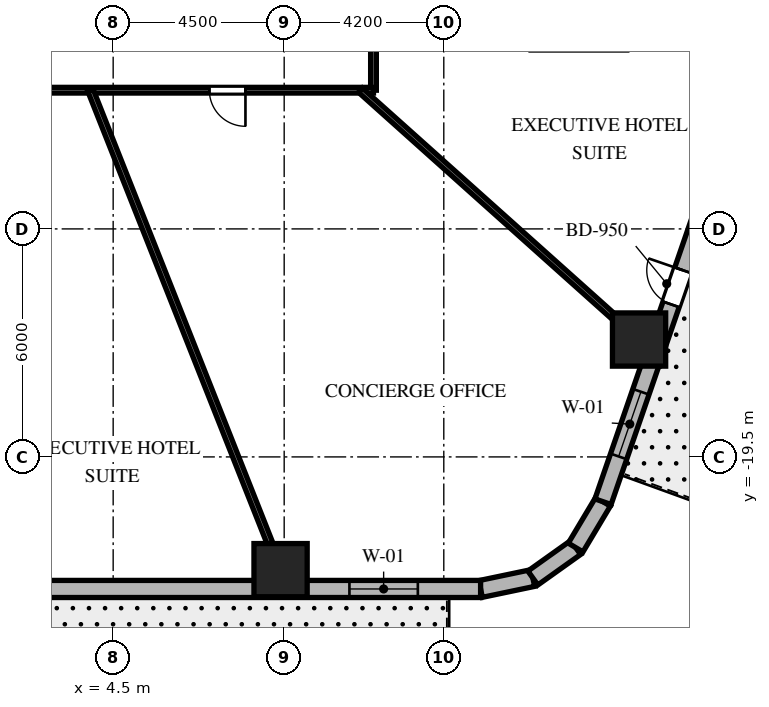
"""IFC4 building model, lengths in metres.
Left out: names, types, materials, properties, quantities, classifications, styles, units other than length and angle.
Written with IfcOpenShell. Run it as: python <this file> out.ifc"""

import sys

from ifc_helpers import new_model, si_unit, direction, frame, frame_2d, origin, origin_2d, place, context, subcontext, project, spatial, rectangle, extrude, element, fill, save


model = new_model("IFC4")
c1 = context("Model", 3, precision=1e-05, world=origin(), true_north=direction((0.0, 1.0)))
c2 = subcontext(c1, "Body", "Model", "MODEL_VIEW")
j1 = project(units=[si_unit("LENGTHUNIT", "METRE"), si_unit("PLANEANGLEUNIT", "RADIAN")], contexts=[c1])
p1 = place(None, origin())
s1 = spatial("IfcSite", under=j1, at=p1, CompositionType="ELEMENT")
p2 = place(p1, origin())
s2 = spatial("IfcBuilding", under=s1, at=p2, CompositionType="ELEMENT")
p3 = place(p2, frame((0.0, 0.0, 67.5)))
s3 = spatial("IfcBuildingStorey", under=s2, at=p3, CompositionType="ELEMENT", Elevation=67.5)
for number, where, z_axis, x_axis in (
    (1, (8.905, -22.48, 0.0), (0.0, 0.0, 1.0), (1.0, 0.0, 0.0)),
    (2, (18.338, -16.411, 0.0), (0.0, 0.0, 1.0), (1.0, 0.0, 0.0)),
):
    element("IfcColumn", number, at=place(p3, frame(where, z_axis=z_axis, x_axis=x_axis)), inside=s3, PredefinedType="COLUMN", context=c2, shape_type="SweptSolid", body=[
        extrude(rectangle(XDim=1.4, YDim=1.4, at=origin_2d()), origin(), (0.0, 0.0, 1.0), 3.7),
    ])
p4 = place(p3, frame((14.168, -22.975, 0.0), z_axis=(0.0, 0.0, 1.0), x_axis=(0.978770371074, 0.204959900243, 0.0)))
e3 = element("IfcWall", 3, at=p4, inside=s3, PredefinedType="SOLIDWALL", context=c2, shape_type="SweptSolid", body=[
    extrude(rectangle(XDim=1.406, YDim=0.45, at=frame_2d((0.703, 0.0))), origin(), (0.0, 0.0, 1.0), 3.4),
])
p5 = place(p3, frame((15.544, -22.687, 0.0), z_axis=(0.0, 0.0, 1.0), x_axis=(0.814210854316, 0.580569276412, 0.0)))
e4 = element("IfcWall", 4, at=p5, inside=s3, PredefinedType="SOLIDWALL", context=c2, shape_type="SweptSolid", body=[
    extrude(rectangle(XDim=1.381, YDim=0.45, at=frame_2d((0.691, 0.0))), origin(), (0.0, 0.0, 1.0), 3.4),
])
p6 = place(p3, frame((16.669, -21.885, 0.0), z_axis=(0.0, 0.0, 1.0), x_axis=(0.512936712947, 0.858426425799, 0.0)))
e5 = element("IfcWall", 5, at=p6, inside=s3, PredefinedType="SOLIDWALL", context=c2, shape_type="SweptSolid", body=[
    extrude(rectangle(XDim=1.406, YDim=0.45, at=frame_2d((0.703, 0.0))), origin(), (0.0, 0.0, 1.0), 3.4),
])
p7 = place(p3, frame((-12.221, -22.975, 0.0), z_axis=(0.0, 0.0, 1.0), x_axis=(1.0, 0.0, 0.0)))
e6 = element("IfcWall", 6, at=p7, inside=s3, PredefinedType="SOLIDWALL", context=c2, shape_type="SweptSolid", body=[
    extrude(rectangle(XDim=26.389, YDim=0.45, at=frame_2d((13.195, 0.0))), origin(), (0.0, 0.0, 1.0), 3.4),
])
p8 = place(p7, frame((2.799, 0.0, 0.0)))
e7 = element("IfcOpeningElement", 7, at=p8, cuts=e6, PredefinedType="OPENING", context=c2, shape_type="SweptSolid", body=[
    extrude(rectangle(XDim=1.0, YDim=2.15, at=frame_2d((0.5, 1.075))), frame((0.0, 0.235, 0.0), z_axis=(0.0, -1.0, 0.0), x_axis=(1.0, 0.0, 0.0)), (0.0, 0.0, 1.0), 0.47),
])
p9 = place(p7, frame((12.296, 0.0, 0.8)))
e8 = element("IfcOpeningElement", 8, at=p9, cuts=e6, PredefinedType="OPENING", context=c2, shape_type="SweptSolid", body=[
    extrude(rectangle(XDim=1.8, YDim=1.8, at=frame_2d((0.9, 0.9))), frame((0.0, 0.235, 0.0), z_axis=(0.0, -1.0, 0.0), x_axis=(1.0, 0.0, 0.0)), (0.0, 0.0, 1.0), 0.47),
])
p10 = place(p7, frame((22.938, 0.0, 0.8)))
e9 = element("IfcOpeningElement", 9, at=p10, cuts=e6, PredefinedType="OPENING", context=c2, shape_type="SweptSolid", body=[
    extrude(rectangle(XDim=1.8, YDim=1.8, at=frame_2d((0.9, 0.9))), frame((0.0, 0.235, 0.0), z_axis=(0.0, -1.0, 0.0), x_axis=(1.0, 0.0, 0.0)), (0.0, 0.0, 1.0), 0.47),
])
p11 = place(p3, frame((17.39, -20.678, 0.0), z_axis=(0.0, 0.0, 1.0), x_axis=(0.326068018294, 0.945346310854, 0.0)))
e10 = element("IfcWall", 10, at=p11, inside=s3, PredefinedType="SOLIDWALL", context=c2, shape_type="SweptSolid", body=[
    extrude(rectangle(XDim=21.793, YDim=0.45, at=frame_2d((10.896, 0.0))), origin(), (0.0, 0.0, 1.0), 3.4),
])
p12 = place(p11, frame((5.493, 0.0, 0.0)))
e11 = element("IfcOpeningElement", 11, at=p12, cuts=e10, PredefinedType="OPENING", context=c2, shape_type="SweptSolid", body=[
    extrude(rectangle(XDim=0.95, YDim=2.15, at=frame_2d((0.475, 1.075))), frame((0.0, 0.235, 0.0), z_axis=(0.0, -1.0, 0.0), x_axis=(1.0, 0.0, 0.0)), (0.0, 0.0, 1.0), 0.47),
])
p13 = place(p11, frame((1.26, 0.0, 0.8)))
e12 = element("IfcOpeningElement", 12, at=p13, cuts=e10, PredefinedType="OPENING", context=c2, shape_type="SweptSolid", body=[
    extrude(rectangle(XDim=1.8, YDim=1.8, at=frame_2d((0.9, 0.9))), frame((0.0, 0.235, 0.0), z_axis=(0.0, -1.0, 0.0), x_axis=(1.0, 0.0, 0.0)), (0.0, 0.0, 1.0), 0.47),
])
p14 = place(p11, frame((9.943, 0.0, 0.8)))
e13 = element("IfcOpeningElement", 13, at=p14, cuts=e10, PredefinedType="OPENING", context=c2, shape_type="SweptSolid", body=[
    extrude(rectangle(XDim=1.8, YDim=1.8, at=frame_2d((0.9, 0.9))), frame((0.0, 0.235, 0.0), z_axis=(0.0, -1.0, 0.0), x_axis=(1.0, 0.0, 0.0)), (0.0, 0.0, 1.0), 0.47),
])
p15 = place(p11, frame((18.68, 0.0, 0.8)))
e14 = element("IfcOpeningElement", 14, at=p15, cuts=e10, PredefinedType="OPENING", context=c2, shape_type="SweptSolid", body=[
    extrude(rectangle(XDim=1.8, YDim=1.8, at=frame_2d((0.9, 0.9))), frame((0.0, 0.235, 0.0), z_axis=(0.0, -1.0, 0.0), x_axis=(1.0, 0.0, 0.0)), (0.0, 0.0, 1.0), 0.47),
])
p16 = place(p3, frame((11.35, 9.85, 0.0), z_axis=(0.0, 0.0, 1.0), x_axis=(0.0, -1.0, 0.0)))
e15 = element("IfcWall", 15, at=p16, inside=s3, PredefinedType="PARTITIONING", context=c2, shape_type="SweptSolid", body=[
    extrude(rectangle(XDim=19.7, YDim=0.15, at=frame_2d((9.85, 0.0))), origin(), (0.0, 0.0, 1.0), 2.84),
])
p17 = place(p16, frame((3.024, 0.0, 0.0)))
e16 = element("IfcOpeningElement", 16, at=p17, cuts=e15, PredefinedType="OPENING", context=c2, shape_type="SweptSolid", body=[
    extrude(rectangle(XDim=0.95, YDim=2.03, at=frame_2d((0.475, 1.015))), frame((0.0, 0.085, 0.0), z_axis=(0.0, -1.0, 0.0), x_axis=(1.0, 0.0, 0.0)), (0.0, 0.0, 1.0), 0.17),
])
p18 = place(p16, frame((15.191, 0.0, 0.0)))
e17 = element("IfcOpeningElement", 17, at=p18, cuts=e15, PredefinedType="OPENING", context=c2, shape_type="SweptSolid", body=[
    extrude(rectangle(XDim=0.95, YDim=2.03, at=frame_2d((0.475, 1.015))), frame((0.0, 0.085, 0.0), z_axis=(0.0, -1.0, 0.0), x_axis=(1.0, 0.0, 0.0)), (0.0, 0.0, 1.0), 0.17),
])
p19 = place(p16, frame((8.838, 0.0, 0.0)))
e18 = element("IfcOpeningElement", 18, at=p19, cuts=e15, PredefinedType="OPENING", context=c2, shape_type="SweptSolid", body=[
    extrude(rectangle(XDim=0.95, YDim=2.03, at=frame_2d((0.475, 1.015))), frame((0.0, 0.085, 0.0), z_axis=(0.0, -1.0, 0.0), x_axis=(1.0, 0.0, 0.0)), (0.0, 0.0, 1.0), 0.17),
])
p20 = place(p3, frame((11.35, -9.85, 0.0), z_axis=(0.0, 0.0, 1.0), x_axis=(-1.0, 0.0, 0.0)))
e19 = element("IfcWall", 19, at=p20, inside=s3, PredefinedType="PARTITIONING", context=c2, shape_type="SweptSolid", body=[
    extrude(rectangle(XDim=22.7, YDim=0.15, at=frame_2d((11.35, 0.0))), origin(), (0.0, 0.0, 1.0), 2.84),
])
p21 = place(p20, frame((18.436, 0.0, 0.0)))
e20 = element("IfcOpeningElement", 20, at=p21, cuts=e19, PredefinedType="OPENING", context=c2, shape_type="SweptSolid", body=[
    extrude(rectangle(XDim=0.95, YDim=2.03, at=frame_2d((0.475, 1.015))), frame((0.0, 0.085, 0.0), z_axis=(0.0, -1.0, 0.0), x_axis=(1.0, 0.0, 0.0)), (0.0, 0.0, 1.0), 0.17),
])
p22 = place(p20, frame((15.176, 0.0, 0.0)))
e21 = element("IfcOpeningElement", 21, at=p22, cuts=e19, PredefinedType="OPENING", context=c2, shape_type="SweptSolid", body=[
    extrude(rectangle(XDim=0.9, YDim=2.03, at=frame_2d((0.45, 1.015))), frame((0.0, 0.085, 0.0), z_axis=(0.0, -1.0, 0.0), x_axis=(1.0, 0.0, 0.0)), (0.0, 0.0, 1.0), 0.17),
])
p23 = place(p20, frame((10.444, 0.0, 0.0)))
e22 = element("IfcOpeningElement", 22, at=p23, cuts=e19, PredefinedType="OPENING", context=c2, shape_type="SweptSolid", body=[
    extrude(rectangle(XDim=0.95, YDim=2.03, at=frame_2d((0.475, 1.015))), frame((0.0, 0.085, 0.0), z_axis=(0.0, -1.0, 0.0), x_axis=(1.0, 0.0, 0.0)), (0.0, 0.0, 1.0), 0.17),
])
p24 = place(p20, frame((3.369, 0.0, 0.0)))
e23 = element("IfcOpeningElement", 23, at=p24, cuts=e19, PredefinedType="OPENING", context=c2, shape_type="SweptSolid", body=[
    extrude(rectangle(XDim=0.95, YDim=2.03, at=frame_2d((0.475, 1.015))), frame((0.0, 0.085, 0.0), z_axis=(0.0, -1.0, 0.0), x_axis=(1.0, 0.0, 0.0)), (0.0, 0.0, 1.0), 0.17),
])
p25 = place(p3, frame((3.902, -9.85, 0.0), z_axis=(0.0, 0.0, 1.0), x_axis=(0.36828765711, -0.929711891728, 0.0)))
e24 = element("IfcWall", 24, at=p25, inside=s3, PredefinedType="PARTITIONING", context=c2, shape_type="SweptSolid", body=[
    extrude(rectangle(XDim=14.117, YDim=0.15, at=frame_2d((7.059, 0.0))), origin(), (0.0, 0.0, 1.0), 2.54),
])
p26 = place(p3, frame((11.007, -9.85, 0.0), z_axis=(0.0, 0.0, 1.0), x_axis=(0.745177305978, -0.666866390407, 0.0)))
e25 = element("IfcWall", 25, at=p26, inside=s3, PredefinedType="PARTITIONING", context=c2, shape_type="SweptSolid", body=[
    extrude(rectangle(XDim=10.375, YDim=0.15, at=frame_2d((5.188, 0.0))), origin(), (0.0, 0.0, 1.0), 2.54),
])
p27 = place(p10, origin())
e26 = element("IfcWindow", 26, at=p27, inside=s3, PartitioningType="SINGLE_PANEL", PredefinedType="WINDOW", context=c2, shape_type="SweptSolid", body=[
    extrude(rectangle(XDim=1.8, YDim=1.8, at=frame_2d((0.9, 0.9))), frame((0.0, 0.03, 0.0), z_axis=(0.0, -1.0, 0.0), x_axis=(1.0, 0.0, 0.0)), (0.0, 0.0, 1.0), 0.06),
])
fill(e9, e26)
p28 = place(p12, origin())
e27 = element("IfcDoor", 27, at=p28, inside=s3, OperationType="SINGLE_SWING_RIGHT", PredefinedType="DOOR", context=c2, shape_type="SweptSolid", body=[
    extrude(rectangle(XDim=0.95, YDim=2.15, at=frame_2d((0.475, 1.075))), frame((0.0, 0.025, 0.0), z_axis=(0.0, -1.0, 0.0), x_axis=(1.0, 0.0, 0.0)), (0.0, 0.0, 1.0), 0.05),
])
fill(e11, e27)
p29 = place(p13, origin())
e28 = element("IfcWindow", 28, at=p29, inside=s3, PartitioningType="SINGLE_PANEL", PredefinedType="WINDOW", context=c2, shape_type="SweptSolid", body=[
    extrude(rectangle(XDim=1.8, YDim=1.8, at=frame_2d((0.9, 0.9))), frame((0.0, 0.03, 0.0), z_axis=(0.0, -1.0, 0.0), x_axis=(1.0, 0.0, 0.0)), (0.0, 0.0, 1.0), 0.06),
])
fill(e12, e28)
p30 = place(p24, origin())
e29 = element("IfcDoor", 29, at=p30, inside=s3, OperationType="SINGLE_SWING_LEFT", PredefinedType="DOOR", context=c2, shape_type="SweptSolid", body=[
    extrude(rectangle(XDim=0.95, YDim=2.03, at=frame_2d((0.475, 1.015))), frame((0.0, 0.025, 0.0), z_axis=(0.0, -1.0, 0.0), x_axis=(1.0, 0.0, 0.0)), (0.0, 0.0, 1.0), 0.05),
])
fill(e23, e29)
save(model, sys.argv[1])
